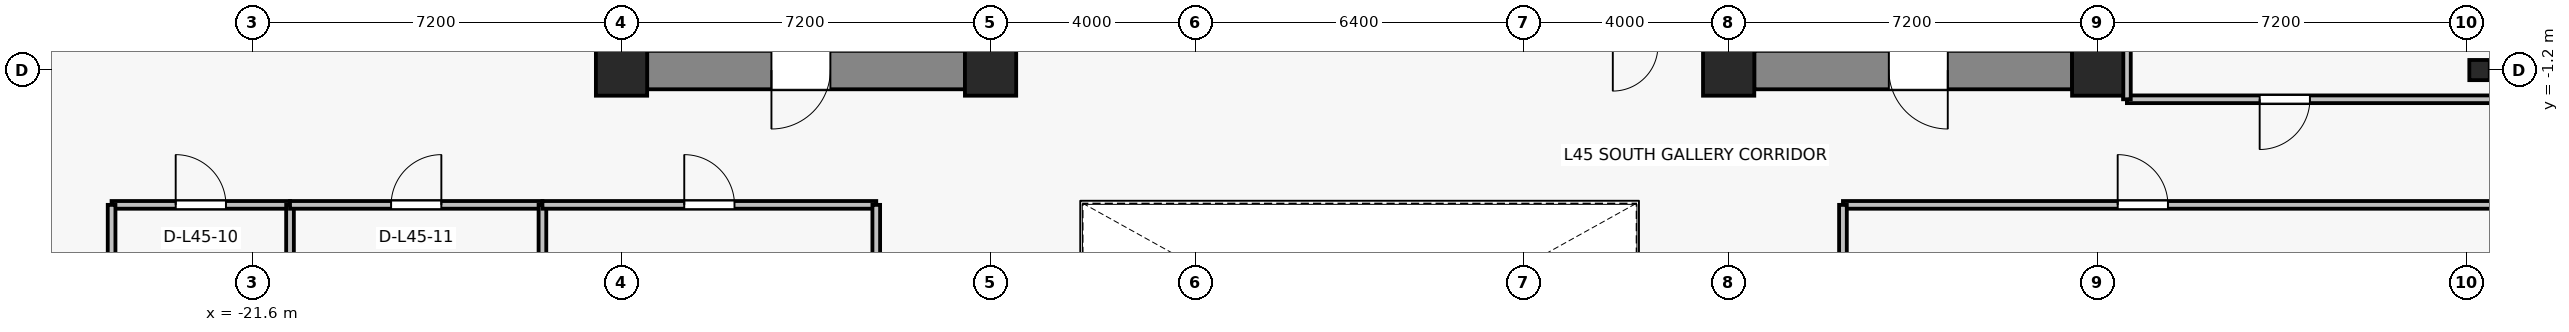
"""IFC4 building model, lengths in metres.
Left out: names, types, materials, properties, quantities, classifications, styles, units other than length and angle.
Written with IfcOpenShell. Run it as: python <this file> out.ifc"""

import sys

from ifc_helpers import new_model, si_unit, direction, frame, frame_2d, origin, origin_2d, place, context, subcontext, project, spatial, rectangle, i_section, extrude, source, transform, mapped, element, fill, save


model = new_model("IFC4")
c1 = context("Model", 3, precision=1e-05, world=origin(), true_north=direction((0.0, 1.0)))
c2 = subcontext(c1, "Body", "Model", "MODEL_VIEW")
j1 = project(units=[si_unit("LENGTHUNIT", "METRE"), si_unit("PLANEANGLEUNIT", "RADIAN")], contexts=[c1])
p1 = place(None, origin())
s1 = spatial("IfcSite", under=j1, at=p1, CompositionType="ELEMENT")
p2 = place(p1, origin())
s2 = spatial("IfcBuilding", under=s1, at=p2, CompositionType="ELEMENT")
p3 = place(p2, frame((0.0, 0.0, 162.7)))
s3 = spatial("IfcBuildingStorey", under=s2, at=p3, CompositionType="ELEMENT", Elevation=162.7)
for number, where, z_axis, x_axis in (
    (1, (-14.4, -1.2, 0.0), (0.0, 0.0, 1.0), (1.0, 0.0, 0.0)),
    (2, (-7.2, -1.2, 0.0), (0.0, 0.0, 1.0), (1.0, 0.0, 0.0)),
    (3, (7.2, -1.2, 0.0), (0.0, 0.0, 1.0), (1.0, 0.0, 0.0)),
    (4, (14.4, -1.2, 0.0), (0.0, 0.0, 1.0), (1.0, 0.0, 0.0)),
):
    element("IfcColumn", number, at=place(p3, frame(where, z_axis=z_axis, x_axis=x_axis)), inside=s3, PredefinedType="COLUMN", context=c2, shape_type="SweptSolid", body=[
        extrude(rectangle(XDim=1.0, YDim=1.0, at=origin_2d()), origin(), (0.0, 0.0, 1.0), 3.3),
    ])
p4 = place(p3, frame((21.85, -1.2, 0.0), z_axis=(0.0, 0.0, 1.0), x_axis=(1.0, 0.0, 0.0)))
e5 = element("IfcColumn", 5, at=p4, inside=s3, PredefinedType="COLUMN", context=c2, shape_type="SweptSolid", body=[
    extrude(i_section(OverallWidth=0.399, OverallDepth=0.394, WebThickness=0.023, FlangeThickness=0.037, FilletRadius=0.015, at=origin_2d()), origin(), (0.0, 0.0, 1.0), 3.3),
])
p5 = place(p3, frame((-7.7, -1.2, 0.0), z_axis=(0.0, 0.0, 1.0), x_axis=(-1.0, 0.0, 0.0)))
e6 = element("IfcWall", 6, at=p5, inside=s3, PredefinedType="SHEAR", context=c2, shape_type="SweptSolid", body=[
    extrude(rectangle(XDim=6.2, YDim=0.75, at=frame_2d((3.1, 0.0))), origin(), (0.0, 0.0, 1.0), 3.075),
])
p6 = place(p5, frame((2.625, 0.0, 0.0)))
e7 = element("IfcOpeningElement", 7, at=p6, cuts=e6, PredefinedType="OPENING", context=c2, shape_type="SweptSolid", body=[
    extrude(rectangle(XDim=1.15, YDim=2.15, at=frame_2d((0.575, 1.075))), frame((0.0, 0.385, 0.0), z_axis=(0.0, -1.0, 0.0), x_axis=(1.0, 0.0, 0.0)), (0.0, 0.0, 1.0), 0.77),
])
p7 = place(p3, frame((13.9, -1.2, 0.0), z_axis=(0.0, 0.0, 1.0), x_axis=(-1.0, 0.0, 0.0)))
e8 = element("IfcWall", 8, at=p7, inside=s3, PredefinedType="SHEAR", context=c2, shape_type="SweptSolid", body=[
    extrude(rectangle(XDim=6.2, YDim=0.75, at=frame_2d((3.1, 0.0))), origin(), (0.0, 0.0, 1.0), 3.075),
])
p8 = place(p7, frame((2.425, 0.0, 0.0)))
e9 = element("IfcOpeningElement", 9, at=p8, cuts=e8, PredefinedType="OPENING", context=c2, shape_type="SweptSolid", body=[
    extrude(rectangle(XDim=1.15, YDim=2.15, at=frame_2d((0.575, 1.075))), frame((0.0, 0.385, 0.0), z_axis=(0.0, -1.0, 0.0), x_axis=(1.0, 0.0, 0.0)), (0.0, 0.0, 1.0), 0.77),
])
p9 = place(p3, frame((-24.349, -3.83, 0.0), z_axis=(0.0, 0.0, 1.0), x_axis=(1.0, 0.0, 0.0)))
e10 = element("IfcWall", 10, at=p9, inside=s3, PredefinedType="PARTITIONING", context=c2, shape_type="SweptSolid", body=[
    extrude(rectangle(XDim=3.481, YDim=0.15, at=frame_2d((1.74, 0.0))), origin(), (0.0, 0.0, 1.0), 3.075),
])
p10 = place(p9, frame((1.25, 0.0, 0.0)))
e11 = element("IfcOpeningElement", 11, at=p10, cuts=e10, PredefinedType="OPENING", context=c2, shape_type="SweptSolid", body=[
    extrude(rectangle(XDim=0.98, YDim=2.15, at=frame_2d((0.49, 1.075))), frame((0.0, 0.085, 0.0), z_axis=(0.0, -1.0, 0.0), x_axis=(1.0, 0.0, 0.0)), (0.0, 0.0, 1.0), 0.17),
])
for number, where, z_axis, x_axis in (
    (12, (-24.349, -7.32, 0.0), (0.0, 0.0, 1.0), (0.0, 1.0, 0.0)),
    (13, (-20.868, -3.83, 0.0), (0.0, 0.0, 1.0), (0.0, -1.0, 0.0)),
):
    element("IfcWall", number, at=place(p3, frame(where, z_axis=z_axis, x_axis=x_axis)), inside=s3, PredefinedType="PARTITIONING", context=c2, shape_type="SweptSolid", body=[
        extrude(rectangle(XDim=3.49, YDim=0.15, at=frame_2d((1.745, 0.0))), origin(), (0.0, 0.0, 1.0), 3.075),
    ])
p11 = place(p3, frame((-20.868, -3.83, 0.0), z_axis=(0.0, 0.0, 1.0), x_axis=(1.0, 0.0, 0.0)))
e14 = element("IfcWall", 14, at=p11, inside=s3, PredefinedType="PARTITIONING", context=c2, shape_type="SweptSolid", body=[
    extrude(rectangle(XDim=4.925, YDim=0.15, at=frame_2d((2.462, 0.0))), origin(), (0.0, 0.0, 1.0), 3.075),
])
p12 = place(p11, frame((1.973, 0.0, 0.0)))
e15 = element("IfcOpeningElement", 15, at=p12, cuts=e14, PredefinedType="OPENING", context=c2, shape_type="SweptSolid", body=[
    extrude(rectangle(XDim=0.98, YDim=2.15, at=frame_2d((0.49, 1.075))), frame((0.0, 0.085, 0.0), z_axis=(0.0, -1.0, 0.0), x_axis=(1.0, 0.0, 0.0)), (0.0, 0.0, 1.0), 0.17),
])
p13 = place(p3, frame((-15.943, -3.83, 0.0), z_axis=(0.0, 0.0, 1.0), x_axis=(0.0, -1.0, 0.0)))
e16 = element("IfcWall", 16, at=p13, inside=s3, PredefinedType="PARTITIONING", context=c2, shape_type="SweptSolid", body=[
    extrude(rectangle(XDim=3.49, YDim=0.15, at=frame_2d((1.745, 0.0))), origin(), (0.0, 0.0, 1.0), 3.075),
])
p14 = place(p3, frame((-15.943, -3.83, 0.0), z_axis=(0.0, 0.0, 1.0), x_axis=(1.0, 0.0, 0.0)))
e17 = element("IfcWall", 17, at=p14, inside=s3, PredefinedType="PARTITIONING", context=c2, shape_type="SweptSolid", body=[
    extrude(rectangle(XDim=6.513, YDim=0.15, at=frame_2d((3.257, 0.0))), origin(), (0.0, 0.0, 1.0), 2.565),
])
p15 = place(p14, frame((2.767, 0.0, 0.0)))
e18 = element("IfcOpeningElement", 18, at=p15, cuts=e17, PredefinedType="OPENING", context=c2, shape_type="SweptSolid", body=[
    extrude(rectangle(XDim=0.98, YDim=2.15, at=frame_2d((0.49, 1.075))), frame((0.0, 0.085, 0.0), z_axis=(0.0, -1.0, 0.0), x_axis=(1.0, 0.0, 0.0)), (0.0, 0.0, 1.0), 0.17),
])
p16 = place(p3, frame((-9.43, -3.83, 0.0), z_axis=(0.0, 0.0, 1.0), x_axis=(0.0, -1.0, 0.0)))
e19 = element("IfcWall", 19, at=p16, inside=s3, PredefinedType="PARTITIONING", context=c2, shape_type="SweptSolid", body=[
    extrude(rectangle(XDim=3.49, YDim=0.15, at=frame_2d((1.745, 0.0))), origin(), (0.0, 0.0, 1.0), 2.665),
])
p17 = place(p3, frame((9.43, -3.83, 0.0), z_axis=(0.0, 0.0, 1.0), x_axis=(1.0, 0.0, 0.0)))
e20 = element("IfcWall", 20, at=p17, inside=s3, PredefinedType="PARTITIONING", context=c2, shape_type="SweptSolid", body=[
    extrude(rectangle(XDim=13.1, YDim=0.15, at=frame_2d((6.55, 0.0))), origin(), (0.0, 0.0, 1.0), 2.565),
])
p18 = place(p17, frame((5.36, 0.0, 0.0)))
e21 = element("IfcOpeningElement", 21, at=p18, cuts=e20, PredefinedType="OPENING", context=c2, shape_type="SweptSolid", body=[
    extrude(rectangle(XDim=0.98, YDim=2.15, at=frame_2d((0.49, 1.075))), frame((0.0, 0.085, 0.0), z_axis=(0.0, -1.0, 0.0), x_axis=(1.0, 0.0, 0.0)), (0.0, 0.0, 1.0), 0.17),
])
p19 = place(p3, frame((9.43, -7.32, 0.0), z_axis=(0.0, 0.0, 1.0), x_axis=(0.0, 1.0, 0.0)))
e22 = element("IfcWall", 22, at=p19, inside=s3, PredefinedType="PARTITIONING", context=c2, shape_type="SweptSolid", body=[
    extrude(rectangle(XDim=3.49, YDim=0.15, at=frame_2d((1.745, 0.0))), origin(), (0.0, 0.0, 1.0), 2.665),
])
p20 = place(p3, frame((22.53, -1.77, 0.0), z_axis=(0.0, 0.0, 1.0), x_axis=(-1.0, 0.0, 0.0)))
e23 = element("IfcWall", 23, at=p20, inside=s3, PredefinedType="PARTITIONING", context=c2, shape_type="SweptSolid", body=[
    extrude(rectangle(XDim=7.56, YDim=0.15, at=frame_2d((3.78, 0.0))), origin(), (0.0, 0.0, 1.0), 2.565),
])
p21 = place(p20, frame((3.99, 0.0, 0.0)))
e24 = element("IfcOpeningElement", 24, at=p21, cuts=e23, PredefinedType="OPENING", context=c2, shape_type="SweptSolid", body=[
    extrude(rectangle(XDim=0.98, YDim=2.15, at=frame_2d((0.49, 1.075))), frame((0.0, 0.085, 0.0), z_axis=(0.0, -1.0, 0.0), x_axis=(1.0, 0.0, 0.0)), (0.0, 0.0, 1.0), 0.17),
])
p22 = place(p3, frame((14.97, -1.77, 0.0), z_axis=(0.0, 0.0, 1.0), x_axis=(0.0, 1.0, 0.0)))
e25 = element("IfcWall", 25, at=p22, inside=s3, PredefinedType="PARTITIONING", context=c2, shape_type="SweptSolid", body=[
    extrude(rectangle(XDim=1.07, YDim=0.15, at=frame_2d((0.535, 0.0))), origin(), (0.0, 0.0, 1.0), 2.565),
])
m1 = source(origin(), c2, "Body", "SweptSolid", [
    extrude(rectangle(XDim=1.15, YDim=2.15, at=frame_2d((0.575, 1.075))), frame((0.0, 0.025, 0.0), z_axis=(0.0, -1.0, 0.0), x_axis=(1.0, 0.0, 0.0)), (0.0, 0.0, 1.0), 0.05),
])
p23 = place(p6, origin())
e26 = element("IfcDoor", 26, at=p23, inside=s3, OperationType="SINGLE_SWING_RIGHT", PredefinedType="DOOR", context=c2, shape_type="MappedRepresentation", body=[
    mapped(m1, transform((0.0, 0.0, 0.0), x_axis=(1.0, 0.0, 0.0), y_axis=(0.0, 1.0, 0.0), z_axis=(0.0, 0.0, 1.0), scale=1.0)),
])
fill(e7, e26)
p24 = place(p8, origin())
e27 = element("IfcDoor", 27, at=p24, inside=s3, OperationType="SINGLE_SWING_LEFT", PredefinedType="DOOR", context=c2, shape_type="MappedRepresentation", body=[
    mapped(m1, transform((0.0, 0.0, 0.0), x_axis=(1.0, 0.0, 0.0), y_axis=(0.0, 1.0, 0.0), z_axis=(0.0, 0.0, 1.0), scale=1.0)),
])
fill(e9, e27)
m2 = source(origin(), c2, "Body", "SweptSolid", [
    extrude(rectangle(XDim=0.98, YDim=2.15, at=frame_2d((0.49, 1.075))), frame((0.0, 0.025, 0.0), z_axis=(0.0, -1.0, 0.0), x_axis=(1.0, 0.0, 0.0)), (0.0, 0.0, 1.0), 0.05),
])
p25 = place(p10, origin())
e28 = element("IfcDoor", 28, at=p25, inside=s3, OperationType="SINGLE_SWING_LEFT", PredefinedType="DOOR", context=c2, shape_type="MappedRepresentation", body=[
    mapped(m2, transform((0.0, 0.0, 0.0), x_axis=(1.0, 0.0, 0.0), y_axis=(0.0, 1.0, 0.0), z_axis=(0.0, 0.0, 1.0), scale=1.0)),
])
fill(e11, e28)
p26 = place(p12, origin())
e29 = element("IfcDoor", 29, at=p26, inside=s3, OperationType="SINGLE_SWING_RIGHT", PredefinedType="DOOR", context=c2, shape_type="MappedRepresentation", body=[
    mapped(m2, transform((0.0, 0.0, 0.0), x_axis=(1.0, 0.0, 0.0), y_axis=(0.0, 1.0, 0.0), z_axis=(0.0, 0.0, 1.0), scale=1.0)),
])
fill(e15, e29)
p27 = place(p15, origin())
e30 = element("IfcDoor", 30, at=p27, inside=s3, OperationType="SINGLE_SWING_LEFT", PredefinedType="DOOR", context=c2, shape_type="MappedRepresentation", body=[
    mapped(m2, transform((0.0, 0.0, 0.0), x_axis=(1.0, 0.0, 0.0), y_axis=(0.0, 1.0, 0.0), z_axis=(0.0, 0.0, 1.0), scale=1.0)),
])
fill(e18, e30)
p28 = place(p18, origin())
e31 = element("IfcDoor", 31, at=p28, inside=s3, OperationType="SINGLE_SWING_LEFT", PredefinedType="DOOR", context=c2, shape_type="MappedRepresentation", body=[
    mapped(m2, transform((0.0, 0.0, 0.0), x_axis=(1.0, 0.0, 0.0), y_axis=(0.0, 1.0, 0.0), z_axis=(0.0, 0.0, 1.0), scale=1.0)),
])
fill(e21, e31)
p29 = place(p21, origin())
e32 = element("IfcDoor", 32, at=p29, inside=s3, OperationType="SINGLE_SWING_RIGHT", PredefinedType="DOOR", context=c2, shape_type="MappedRepresentation", body=[
    mapped(m2, transform((0.0, 0.0, 0.0), x_axis=(1.0, 0.0, 0.0), y_axis=(0.0, 1.0, 0.0), z_axis=(0.0, 0.0, 1.0), scale=1.0)),
])
fill(e24, e32)
save(model, sys.argv[1])
